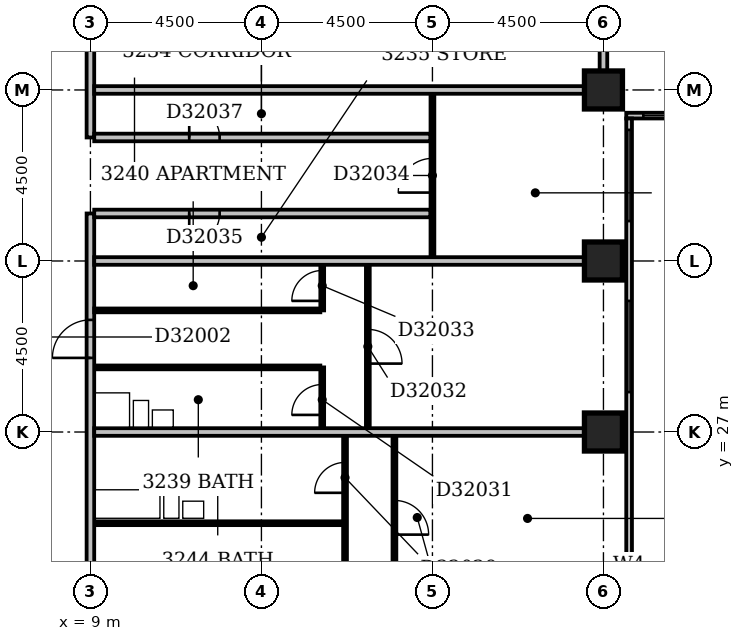
"""IFC4 building model, lengths in metres.
Left out: names, types, materials, properties, quantities, classifications, styles, units other than length and angle.
Written with IfcOpenShell. Run it as: python <this file> out.ifc"""

import sys

from ifc_helpers import new_model, si_unit, direction, frame, frame_2d, origin, origin_2d, place, context, subcontext, project, spatial, rectangle, extrude, element, fill, save


model = new_model("IFC4")
c1 = context("Model", 3, precision=1e-05, world=origin(), true_north=direction((0.0, 1.0)))
c2 = subcontext(c1, "Body", "Model", "MODEL_VIEW")
j1 = project(units=[si_unit("LENGTHUNIT", "METRE"), si_unit("PLANEANGLEUNIT", "RADIAN")], contexts=[c1])
p1 = place(None, origin())
s1 = spatial("IfcSite", under=j1, at=p1, CompositionType="ELEMENT")
p2 = place(p1, origin())
s2 = spatial("IfcBuilding", under=s1, at=p2, CompositionType="ELEMENT")
p3 = place(p2, frame((0.0, 0.0, 130.4)))
s3 = spatial("IfcBuildingStorey", under=s2, at=p3, CompositionType="ELEMENT", Elevation=130.4)
for number, where, z_axis, x_axis in (
    (1, (22.5, 27.0, -0.3), (0.0, 0.0, 1.0), (1.0, 0.0, 0.0)),
    (2, (22.5, 31.5, -0.3), (0.0, 0.0, 1.0), (1.0, 0.0, 0.0)),
    (3, (22.5, 36.0, -0.3), (0.0, 0.0, 1.0), (1.0, 0.0, 0.0)),
):
    element("IfcColumn", number, at=place(p3, frame(where, z_axis=z_axis, x_axis=x_axis)), inside=s3, PredefinedType="COLUMN", context=c2, shape_type="SweptSolid", body=[
        extrude(rectangle(XDim=1.0, YDim=1.0, at=origin_2d()), origin(), (0.0, 0.0, 1.0), 3.6),
    ])
p4 = place(p3, frame((23.175, 17.4, 0.0), z_axis=(0.0, 0.0, 1.0), x_axis=(0.0, 1.0, 0.0)))
e4 = element("IfcWall", 4, at=p4, inside=s3, PredefinedType="STANDARD", context=c2, shape_type="SweptSolid", body=[
    extrude(rectangle(XDim=17.85, YDim=0.15, at=frame_2d((8.925, 0.0))), origin(), (0.0, 0.0, 1.0), 2.7),
])
p5 = place(p4, frame((1.65, 0.0, 0.6)))
e5 = element("IfcOpeningElement", 5, at=p5, cuts=e4, PredefinedType="OPENING", context=c2, shape_type="SweptSolid", body=[
    extrude(rectangle(XDim=2.4, YDim=1.8, at=frame_2d((1.2, 0.9))), frame((0.0, 0.087, 0.0), z_axis=(0.0, -1.0, 0.0), x_axis=(1.0, 0.0, 0.0)), (0.0, 0.0, 1.0), 0.174),
])
p6 = place(p4, frame((5.801, 0.0, 0.6)))
e6 = element("IfcOpeningElement", 6, at=p6, cuts=e4, PredefinedType="OPENING", context=c2, shape_type="SweptSolid", body=[
    extrude(rectangle(XDim=0.6, YDim=1.8, at=frame_2d((0.3, 0.9))), frame((0.0, 0.087, 0.0), z_axis=(0.0, -1.0, 0.0), x_axis=(1.0, 0.0, 0.0)), (0.0, 0.0, 1.0), 0.174),
])
p7 = place(p4, frame((10.65, 0.0, 0.6)))
e7 = element("IfcOpeningElement", 7, at=p7, cuts=e4, PredefinedType="OPENING", context=c2, shape_type="SweptSolid", body=[
    extrude(rectangle(XDim=2.4, YDim=1.8, at=frame_2d((1.2, 0.9))), frame((0.0, 0.087, 0.0), z_axis=(0.0, -1.0, 0.0), x_axis=(1.0, 0.0, 0.0)), (0.0, 0.0, 1.0), 0.174),
])
p8 = place(p4, frame((15.15, 0.0, 0.6)))
e8 = element("IfcOpeningElement", 8, at=p8, cuts=e4, PredefinedType="OPENING", context=c2, shape_type="SweptSolid", body=[
    extrude(rectangle(XDim=2.4, YDim=1.8, at=frame_2d((1.2, 0.9))), frame((0.0, 0.087, 0.0), z_axis=(0.0, -1.0, 0.0), x_axis=(1.0, 0.0, 0.0)), (0.0, 0.0, 1.0), 0.174),
])
p9 = place(p3, frame((23.1, 35.325, 0.0), z_axis=(0.0, 0.0, 1.0), x_axis=(1.0, 0.0, 0.0)))
e9 = element("IfcWall", 9, at=p9, inside=s3, PredefinedType="STANDARD", context=c2, shape_type="SweptSolid", body=[
    extrude(rectangle(XDim=45.15, YDim=0.15, at=frame_2d((22.575, 0.0))), origin(), (0.0, 0.0, 1.0), 2.7),
])
p10 = place(p9, frame((0.45, 0.0, 0.6)))
e10 = element("IfcOpeningElement", 10, at=p10, cuts=e9, PredefinedType="OPENING", context=c2, shape_type="SweptSolid", body=[
    extrude(rectangle(XDim=2.4, YDim=1.8, at=frame_2d((1.2, 0.9))), frame((0.0, 0.087, 0.0), z_axis=(0.0, -1.0, 0.0), x_axis=(1.0, 0.0, 0.0)), (0.0, 0.0, 1.0), 0.174),
])
p11 = place(p9, frame((6.417, 0.0, 0.6)))
e11 = element("IfcOpeningElement", 11, at=p11, cuts=e9, PredefinedType="OPENING", context=c2, shape_type="SweptSolid", body=[
    extrude(rectangle(XDim=1.2, YDim=1.8, at=frame_2d((0.6, 0.9))), frame((0.0, 0.087, 0.0), z_axis=(0.0, -1.0, 0.0), x_axis=(1.0, 0.0, 0.0)), (0.0, 0.0, 1.0), 0.174),
])
p12 = place(p9, frame((9.45, 0.0, 0.6)))
e12 = element("IfcOpeningElement", 12, at=p12, cuts=e9, PredefinedType="OPENING", context=c2, shape_type="SweptSolid", body=[
    extrude(rectangle(XDim=2.4, YDim=1.8, at=frame_2d((1.2, 0.9))), frame((0.0, 0.087, 0.0), z_axis=(0.0, -1.0, 0.0), x_axis=(1.0, 0.0, 0.0)), (0.0, 0.0, 1.0), 0.174),
])
p13 = place(p9, frame((13.95, 0.0, 0.6)))
e13 = element("IfcOpeningElement", 13, at=p13, cuts=e9, PredefinedType="OPENING", context=c2, shape_type="SweptSolid", body=[
    extrude(rectangle(XDim=2.4, YDim=1.8, at=frame_2d((1.2, 0.9))), frame((0.0, 0.087, 0.0), z_axis=(0.0, -1.0, 0.0), x_axis=(1.0, 0.0, 0.0)), (0.0, 0.0, 1.0), 0.174),
])
p14 = place(p9, frame((18.16, 0.0, 0.6)))
e14 = element("IfcOpeningElement", 14, at=p14, cuts=e9, PredefinedType="OPENING", context=c2, shape_type="SweptSolid", body=[
    extrude(rectangle(XDim=1.8, YDim=1.8, at=frame_2d((0.9, 0.9))), frame((0.0, 0.087, 0.0), z_axis=(0.0, -1.0, 0.0), x_axis=(1.0, 0.0, 0.0)), (0.0, 0.0, 1.0), 0.174),
])
p15 = place(p9, frame((22.95, 0.0, 0.6)))
e15 = element("IfcOpeningElement", 15, at=p15, cuts=e9, PredefinedType="OPENING", context=c2, shape_type="SweptSolid", body=[
    extrude(rectangle(XDim=2.4, YDim=1.8, at=frame_2d((1.2, 0.9))), frame((0.0, 0.087, 0.0), z_axis=(0.0, -1.0, 0.0), x_axis=(1.0, 0.0, 0.0)), (0.0, 0.0, 1.0), 0.174),
])
p16 = place(p9, frame((27.45, 0.0, 0.6)))
e16 = element("IfcOpeningElement", 16, at=p16, cuts=e9, PredefinedType="OPENING", context=c2, shape_type="SweptSolid", body=[
    extrude(rectangle(XDim=2.4, YDim=1.8, at=frame_2d((1.2, 0.9))), frame((0.0, 0.087, 0.0), z_axis=(0.0, -1.0, 0.0), x_axis=(1.0, 0.0, 0.0)), (0.0, 0.0, 1.0), 0.174),
])
p17 = place(p9, frame((31.631, 0.0, 0.6)))
e17 = element("IfcOpeningElement", 17, at=p17, cuts=e9, PredefinedType="OPENING", context=c2, shape_type="SweptSolid", body=[
    extrude(rectangle(XDim=0.9, YDim=1.8, at=frame_2d((0.45, 0.9))), frame((0.0, 0.087, 0.0), z_axis=(0.0, -1.0, 0.0), x_axis=(1.0, 0.0, 0.0)), (0.0, 0.0, 1.0), 0.174),
])
p18 = place(p9, frame((36.45, 0.0, 0.6)))
e18 = element("IfcOpeningElement", 18, at=p18, cuts=e9, PredefinedType="OPENING", context=c2, shape_type="SweptSolid", body=[
    extrude(rectangle(XDim=2.4, YDim=1.8, at=frame_2d((1.2, 0.9))), frame((0.0, 0.087, 0.0), z_axis=(0.0, -1.0, 0.0), x_axis=(1.0, 0.0, 0.0)), (0.0, 0.0, 1.0), 0.174),
])
p19 = place(p9, frame((40.95, 0.0, 0.6)))
e19 = element("IfcOpeningElement", 19, at=p19, cuts=e9, PredefinedType="OPENING", context=c2, shape_type="SweptSolid", body=[
    extrude(rectangle(XDim=2.4, YDim=1.8, at=frame_2d((1.2, 0.9))), frame((0.0, 0.087, 0.0), z_axis=(0.0, -1.0, 0.0), x_axis=(1.0, 0.0, 0.0)), (0.0, 0.0, 1.0), 0.174),
])
p20 = place(p3, frame((9.0, 5.0, 0.0), z_axis=(0.0, 0.0, 1.0), x_axis=(0.0, 1.0, 0.0)))
e20 = element("IfcWall", 20, at=p20, inside=s3, PredefinedType="PARTITIONING", context=c2, shape_type="SweptSolid", body=[
    extrude(rectangle(XDim=27.75, YDim=0.2, at=frame_2d((13.875, 0.0))), origin(), (0.0, 0.0, 1.0), 3.3),
])
p21 = place(p20, frame((23.95, 0.0, 0.0)))
e21 = element("IfcOpeningElement", 21, at=p21, cuts=e20, PredefinedType="OPENING", context=c2, shape_type="SweptSolid", body=[
    extrude(rectangle(XDim=1.0, YDim=2.1, at=frame_2d((0.5, 1.05))), frame((0.0, 0.112, 0.0), z_axis=(0.0, -1.0, 0.0), x_axis=(1.0, 0.0, 0.0)), (0.0, 0.0, 1.0), 0.224),
])
p22 = place(p20, frame((13.3, 0.0, 0.0)))
e22 = element("IfcOpeningElement", 22, at=p22, cuts=e20, PredefinedType="OPENING", context=c2, shape_type="SweptSolid", body=[
    extrude(rectangle(XDim=1.0, YDim=2.1, at=frame_2d((0.5, 1.05))), frame((0.0, 0.112, 0.0), z_axis=(0.0, -1.0, 0.0), x_axis=(1.0, 0.0, 0.0)), (0.0, 0.0, 1.0), 0.224),
])
p23 = place(p20, frame((11.7, 0.0, 0.0)))
e23 = element("IfcOpeningElement", 23, at=p23, cuts=e20, PredefinedType="OPENING", context=c2, shape_type="SweptSolid", body=[
    extrude(rectangle(XDim=1.0, YDim=2.1, at=frame_2d((0.5, 1.05))), frame((0.0, 0.112, 0.0), z_axis=(0.0, -1.0, 0.0), x_axis=(1.0, 0.0, 0.0)), (0.0, 0.0, 1.0), 0.224),
])
p24 = place(p20, frame((1.5, 0.0, 0.0)))
e24 = element("IfcOpeningElement", 24, at=p24, cuts=e20, PredefinedType="OPENING", context=c2, shape_type="SweptSolid", body=[
    extrude(rectangle(XDim=0.9, YDim=2.1, at=frame_2d((0.45, 1.05))), frame((0.0, 0.112, 0.0), z_axis=(0.0, -1.0, 0.0), x_axis=(1.0, 0.0, 0.0)), (0.0, 0.0, 1.0), 0.224),
])
p25 = place(p3, frame((17.0, 18.1, 0.0), z_axis=(0.0, 0.0, 1.0), x_axis=(0.0, 1.0, 0.0)))
e25 = element("IfcWall", 25, at=p25, inside=s3, PredefinedType="PARTITIONING", context=c2, shape_type="SweptSolid", body=[
    extrude(rectangle(XDim=8.8, YDim=0.1, at=frame_2d((4.4, 0.0))), origin(), (0.0, 0.0, 1.0), 3.3),
])
p26 = place(p25, frame((1.7, 0.0, 0.0)))
e26 = element("IfcOpeningElement", 26, at=p26, cuts=e25, PredefinedType="OPENING", context=c2, shape_type="SweptSolid", body=[
    extrude(rectangle(XDim=0.9, YDim=2.1, at=frame_2d((0.45, 1.05))), frame((0.0, 0.062, 0.0), z_axis=(0.0, -1.0, 0.0), x_axis=(1.0, 0.0, 0.0)), (0.0, 0.0, 1.0), 0.124),
])
p27 = place(p25, frame((6.2, 0.0, 0.0)))
e27 = element("IfcOpeningElement", 27, at=p27, cuts=e25, PredefinedType="OPENING", context=c2, shape_type="SweptSolid", body=[
    extrude(rectangle(XDim=0.9, YDim=2.1, at=frame_2d((0.45, 1.05))), frame((0.0, 0.062, 0.0), z_axis=(0.0, -1.0, 0.0), x_axis=(1.0, 0.0, 0.0)), (0.0, 0.0, 1.0), 0.124),
])
p28 = place(p3, frame((15.7, 19.6, 0.0), z_axis=(0.0, 0.0, 1.0), x_axis=(0.0, 1.0, 0.0)))
e28 = element("IfcWall", 28, at=p28, inside=s3, PredefinedType="PARTITIONING", context=c2, shape_type="SweptSolid", body=[
    extrude(rectangle(XDim=7.3, YDim=0.1, at=frame_2d((3.65, 0.0))), origin(), (0.0, 0.0, 1.0), 3.3),
])
p29 = place(p28, frame((5.8, 0.0, 0.0)))
e29 = element("IfcOpeningElement", 29, at=p29, cuts=e28, PredefinedType="OPENING", context=c2, shape_type="SweptSolid", body=[
    extrude(rectangle(XDim=0.8, YDim=2.1, at=frame_2d((0.4, 1.05))), frame((0.0, 0.062, 0.0), z_axis=(0.0, -1.0, 0.0), x_axis=(1.0, 0.0, 0.0)), (0.0, 0.0, 1.0), 0.124),
])
p30 = place(p28, frame((2.05, 0.0, 0.0)))
e30 = element("IfcOpeningElement", 30, at=p30, cuts=e28, PredefinedType="OPENING", context=c2, shape_type="SweptSolid", body=[
    extrude(rectangle(XDim=0.9, YDim=2.1, at=frame_2d((0.45, 1.05))), frame((0.0, 0.062, 0.0), z_axis=(0.0, -1.0, 0.0), x_axis=(1.0, 0.0, 0.0)), (0.0, 0.0, 1.0), 0.124),
])
p31 = place(p3, frame((9.1, 24.6, 0.0), z_axis=(0.0, 0.0, 1.0), x_axis=(1.0, 0.0, 0.0)))
e31 = element("IfcWall", 31, at=p31, inside=s3, PredefinedType="PLUMBINGWALL", context=c2, shape_type="SweptSolid", body=[
    extrude(rectangle(XDim=6.55, YDim=0.1, at=frame_2d((3.275, 0.0))), origin(), (0.0, 0.0, 1.0), 3.3),
])
p32 = place(p3, frame((9.1, 27.0, 0.0), z_axis=(0.0, 0.0, 1.0), x_axis=(1.0, 0.0, 0.0)))
e32 = element("IfcWall", 32, at=p32, inside=s3, PredefinedType="PARTITIONING", context=c2, shape_type="SweptSolid", body=[
    extrude(rectangle(XDim=12.9, YDim=0.2, at=frame_2d((6.45, 0.0))), origin(), (0.0, 0.0, 1.0), 2.7),
])
p33 = place(p3, frame((15.1, 27.1, 0.0), z_axis=(0.0, 0.0, 1.0), x_axis=(0.0, 1.0, 0.0)))
e33 = element("IfcWall", 33, at=p33, inside=s3, PredefinedType="PARTITIONING", context=c2, shape_type="SweptSolid", body=[
    extrude(rectangle(XDim=1.6, YDim=0.1, at=frame_2d((0.8, 0.0))), origin(), (0.0, 0.0, 1.0), 3.3),
])
p34 = place(p33, frame((0.35, 0.0, 0.0)))
e34 = element("IfcOpeningElement", 34, at=p34, cuts=e33, PredefinedType="OPENING", context=c2, shape_type="SweptSolid", body=[
    extrude(rectangle(XDim=0.8, YDim=2.1, at=frame_2d((0.4, 1.05))), frame((0.0, 0.062, 0.0), z_axis=(0.0, -1.0, 0.0), x_axis=(1.0, 0.0, 0.0)), (0.0, 0.0, 1.0), 0.124),
])
p35 = place(p3, frame((16.3, 27.1, 0.0), z_axis=(0.0, 0.0, 1.0), x_axis=(0.0, 1.0, 0.0)))
e35 = element("IfcWall", 35, at=p35, inside=s3, PredefinedType="PARTITIONING", context=c2, shape_type="SweptSolid", body=[
    extrude(rectangle(XDim=4.3, YDim=0.1, at=frame_2d((2.15, 0.0))), origin(), (0.0, 0.0, 1.0), 3.3),
])
p36 = place(p35, frame((1.7, 0.0, 0.0)))
e36 = element("IfcOpeningElement", 36, at=p36, cuts=e35, PredefinedType="OPENING", context=c2, shape_type="SweptSolid", body=[
    extrude(rectangle(XDim=0.9, YDim=2.1, at=frame_2d((0.45, 1.05))), frame((0.0, 0.062, 0.0), z_axis=(0.0, -1.0, 0.0), x_axis=(1.0, 0.0, 0.0)), (0.0, 0.0, 1.0), 0.124),
])
p37 = place(p3, frame((9.1, 28.7, 0.0), z_axis=(0.0, 0.0, 1.0), x_axis=(1.0, 0.0, 0.0)))
e37 = element("IfcWall", 37, at=p37, inside=s3, PredefinedType="PLUMBINGWALL", context=c2, shape_type="SweptSolid", body=[
    extrude(rectangle(XDim=5.95, YDim=0.1, at=frame_2d((2.975, 0.0))), origin(), (0.0, 0.0, 1.0), 3.3),
])
p38 = place(p3, frame((9.1, 30.2, 0.0), z_axis=(0.0, 0.0, 1.0), x_axis=(1.0, 0.0, 0.0)))
e38 = element("IfcWall", 38, at=p38, inside=s3, PredefinedType="PARTITIONING", context=c2, shape_type="SweptSolid", body=[
    extrude(rectangle(XDim=5.95, YDim=0.1, at=frame_2d((2.975, 0.0))), origin(), (0.0, 0.0, 1.0), 3.3),
])
p39 = place(p3, frame((15.1, 30.2, 0.0), z_axis=(0.0, 0.0, 1.0), x_axis=(0.0, 1.0, 0.0)))
e39 = element("IfcWall", 39, at=p39, inside=s3, PredefinedType="PARTITIONING", context=c2, shape_type="SweptSolid", body=[
    extrude(rectangle(XDim=1.2, YDim=0.1, at=frame_2d((0.6, 0.0))), origin(), (0.0, 0.0, 1.0), 3.3),
])
p40 = place(p39, frame((0.25, 0.0, 0.0)))
e40 = element("IfcOpeningElement", 40, at=p40, cuts=e39, PredefinedType="OPENING", context=c2, shape_type="SweptSolid", body=[
    extrude(rectangle(XDim=0.8, YDim=2.1, at=frame_2d((0.4, 1.05))), frame((0.0, 0.062, 0.0), z_axis=(0.0, -1.0, 0.0), x_axis=(1.0, 0.0, 0.0)), (0.0, 0.0, 1.0), 0.124),
])
p41 = place(p3, frame((9.1, 31.5, 0.0), z_axis=(0.0, 0.0, 1.0), x_axis=(1.0, 0.0, 0.0)))
e41 = element("IfcWall", 41, at=p41, inside=s3, PredefinedType="PARTITIONING", context=c2, shape_type="SweptSolid", body=[
    extrude(rectangle(XDim=12.9, YDim=0.2, at=frame_2d((6.45, 0.0))), origin(), (0.0, 0.0, 1.0), 3.3),
])
p42 = place(p3, frame((18.0, 31.6, 0.0), z_axis=(0.0, 0.0, 1.0), x_axis=(0.0, 1.0, 0.0)))
e42 = element("IfcWall", 42, at=p42, inside=s3, PredefinedType="PARTITIONING", context=c2, shape_type="SweptSolid", body=[
    extrude(rectangle(XDim=4.3, YDim=0.1, at=frame_2d((2.15, 0.0))), origin(), (0.0, 0.0, 1.0), 3.3),
])
p43 = place(p42, frame((1.7, 0.0, 0.0)))
e43 = element("IfcOpeningElement", 43, at=p43, cuts=e42, PredefinedType="OPENING", context=c2, shape_type="SweptSolid", body=[
    extrude(rectangle(XDim=0.9, YDim=2.1, at=frame_2d((0.45, 1.05))), frame((0.0, 0.062, 0.0), z_axis=(0.0, -1.0, 0.0), x_axis=(1.0, 0.0, 0.0)), (0.0, 0.0, 1.0), 0.124),
])
p44 = place(p3, frame((9.1, 32.75, 0.0), z_axis=(0.0, 0.0, 1.0), x_axis=(1.0, 0.0, 0.0)))
e44 = element("IfcWall", 44, at=p44, inside=s3, PredefinedType="PARTITIONING", context=c2, shape_type="SweptSolid", body=[
    extrude(rectangle(XDim=8.85, YDim=0.2, at=frame_2d((4.425, 0.0))), origin(), (0.0, 0.0, 1.0), 3.3),
])
p45 = place(p44, frame((2.5, 0.0, 0.0)))
e45 = element("IfcOpeningElement", 45, at=p45, cuts=e44, PredefinedType="OPENING", context=c2, shape_type="SweptSolid", body=[
    extrude(rectangle(XDim=0.8, YDim=2.1, at=frame_2d((0.4, 1.05))), frame((0.0, 0.112, 0.0), z_axis=(0.0, -1.0, 0.0), x_axis=(1.0, 0.0, 0.0)), (0.0, 0.0, 1.0), 0.224),
])
p46 = place(p3, frame((9.0, 34.75, 0.0), z_axis=(0.0, 0.0, 1.0), x_axis=(0.0, 1.0, 0.0)))
e46 = element("IfcWall", 46, at=p46, inside=s3, PredefinedType="PARTITIONING", context=c2, shape_type="SweptSolid", body=[
    extrude(rectangle(XDim=14.75, YDim=0.2, at=frame_2d((7.375, 0.0))), origin(), (0.0, 0.0, 1.0), 3.3),
])
p47 = place(p46, frame((5.25, 0.0, 0.0)))
e47 = element("IfcOpeningElement", 47, at=p47, cuts=e46, PredefinedType="OPENING", context=c2, shape_type="SweptSolid", body=[
    extrude(rectangle(XDim=0.9, YDim=2.1, at=frame_2d((0.45, 1.05))), frame((0.0, 0.112, 0.0), z_axis=(0.0, -1.0, 0.0), x_axis=(1.0, 0.0, 0.0)), (0.0, 0.0, 1.0), 0.224),
])
p48 = place(p3, frame((9.1, 34.75, 0.0), z_axis=(0.0, 0.0, 1.0), x_axis=(1.0, 0.0, 0.0)))
e48 = element("IfcWall", 48, at=p48, inside=s3, PredefinedType="PARTITIONING", context=c2, shape_type="SweptSolid", body=[
    extrude(rectangle(XDim=8.85, YDim=0.2, at=frame_2d((4.425, 0.0))), origin(), (0.0, 0.0, 1.0), 3.3),
])
p49 = place(p48, frame((2.5, 0.0, 0.0)))
e49 = element("IfcOpeningElement", 49, at=p49, cuts=e48, PredefinedType="OPENING", context=c2, shape_type="SweptSolid", body=[
    extrude(rectangle(XDim=0.8, YDim=2.1, at=frame_2d((0.4, 1.05))), frame((0.0, 0.112, 0.0), z_axis=(0.0, -1.0, 0.0), x_axis=(1.0, 0.0, 0.0)), (0.0, 0.0, 1.0), 0.224),
])
for number, where, z_axis, x_axis in (
    (50, (9.1, 36.0, 0.0), (0.0, 0.0, 1.0), (1.0, 0.0, 0.0)),
    (51, (22.5, 36.5, 0.0), (0.0, 0.0, 1.0), (0.0, 1.0, 0.0)),
):
    element("IfcWall", number, at=place(p3, frame(where, z_axis=z_axis, x_axis=x_axis)), inside=s3, PredefinedType="PARTITIONING", context=c2, shape_type="SweptSolid", body=[
        extrude(rectangle(XDim=12.9, YDim=0.2, at=frame_2d((6.45, 0.0))), origin(), (0.0, 0.0, 1.0), 3.3),
    ])
p50 = place(p6, origin())
e52 = element("IfcWindow", 52, at=p50, inside=s3, PartitioningType="SINGLE_PANEL", PredefinedType="WINDOW", context=c2, shape_type="SweptSolid", body=[
    extrude(rectangle(XDim=0.6, YDim=1.8, at=frame_2d((0.3, 0.9))), frame((0.0, 0.03, 0.0), z_axis=(0.0, -1.0, 0.0), x_axis=(1.0, 0.0, 0.0)), (0.0, 0.0, 1.0), 0.06),
])
fill(e6, e52)
p51 = place(p7, origin())
e53 = element("IfcWindow", 53, at=p51, inside=s3, PartitioningType="SINGLE_PANEL", PredefinedType="WINDOW", context=c2, shape_type="SweptSolid", body=[
    extrude(rectangle(XDim=2.4, YDim=1.8, at=frame_2d((1.2, 0.9))), frame((0.0, 0.03, 0.0), z_axis=(0.0, -1.0, 0.0), x_axis=(1.0, 0.0, 0.0)), (0.0, 0.0, 1.0), 0.06),
])
fill(e7, e53)
p52 = place(p8, origin())
e54 = element("IfcWindow", 54, at=p52, inside=s3, PartitioningType="SINGLE_PANEL", PredefinedType="WINDOW", context=c2, shape_type="SweptSolid", body=[
    extrude(rectangle(XDim=2.4, YDim=1.8, at=frame_2d((1.2, 0.9))), frame((0.0, 0.03, 0.0), z_axis=(0.0, -1.0, 0.0), x_axis=(1.0, 0.0, 0.0)), (0.0, 0.0, 1.0), 0.06),
])
fill(e8, e54)
p53 = place(p10, origin())
e55 = element("IfcWindow", 55, at=p53, inside=s3, PartitioningType="SINGLE_PANEL", PredefinedType="WINDOW", context=c2, shape_type="SweptSolid", body=[
    extrude(rectangle(XDim=2.4, YDim=1.8, at=frame_2d((1.2, 0.9))), frame((0.0, 0.03, 0.0), z_axis=(0.0, -1.0, 0.0), x_axis=(1.0, 0.0, 0.0)), (0.0, 0.0, 1.0), 0.06),
])
fill(e10, e55)
p54 = place(p21, origin())
e56 = element("IfcDoor", 56, at=p54, inside=s3, OperationType="SINGLE_SWING_LEFT", PredefinedType="DOOR", context=c2, shape_type="SweptSolid", body=[
    extrude(rectangle(XDim=1.0, YDim=2.1, at=frame_2d((0.5, 1.05))), frame((0.0, 0.025, 0.0), z_axis=(0.0, -1.0, 0.0), x_axis=(1.0, 0.0, 0.0)), (0.0, 0.0, 1.0), 0.05),
])
fill(e21, e56)
p55 = place(p27, frame((0.9, 0.0, 0.0), z_axis=(0.0, 0.0, 1.0), x_axis=(-1.0, 0.0, 0.0)))
e57 = element("IfcDoor", 57, at=p55, inside=s3, OperationType="SINGLE_SWING_RIGHT", PredefinedType="DOOR", context=c2, shape_type="SweptSolid", body=[
    extrude(rectangle(XDim=0.9, YDim=2.1, at=frame_2d((0.45, 1.05))), frame((0.0, 0.025, 0.0), z_axis=(0.0, -1.0, 0.0), x_axis=(1.0, 0.0, 0.0)), (0.0, 0.0, 1.0), 0.05),
])
fill(e27, e57)
p56 = place(p29, origin())
e58 = element("IfcDoor", 58, at=p56, inside=s3, OperationType="SINGLE_SWING_LEFT", PredefinedType="DOOR", context=c2, shape_type="SweptSolid", body=[
    extrude(rectangle(XDim=0.8, YDim=2.1, at=frame_2d((0.4, 1.05))), frame((0.0, 0.025, 0.0), z_axis=(0.0, -1.0, 0.0), x_axis=(1.0, 0.0, 0.0)), (0.0, 0.0, 1.0), 0.05),
])
fill(e29, e58)
p57 = place(p34, origin())
e59 = element("IfcDoor", 59, at=p57, inside=s3, OperationType="SINGLE_SWING_LEFT", PredefinedType="DOOR", context=c2, shape_type="SweptSolid", body=[
    extrude(rectangle(XDim=0.8, YDim=2.1, at=frame_2d((0.4, 1.05))), frame((0.0, 0.025, 0.0), z_axis=(0.0, -1.0, 0.0), x_axis=(1.0, 0.0, 0.0)), (0.0, 0.0, 1.0), 0.05),
])
fill(e34, e59)
p58 = place(p36, frame((0.9, 0.0, 0.0), z_axis=(0.0, 0.0, 1.0), x_axis=(-1.0, 0.0, 0.0)))
e60 = element("IfcDoor", 60, at=p58, inside=s3, OperationType="SINGLE_SWING_RIGHT", PredefinedType="DOOR", context=c2, shape_type="SweptSolid", body=[
    extrude(rectangle(XDim=0.9, YDim=2.1, at=frame_2d((0.45, 1.05))), frame((0.0, 0.025, 0.0), z_axis=(0.0, -1.0, 0.0), x_axis=(1.0, 0.0, 0.0)), (0.0, 0.0, 1.0), 0.05),
])
fill(e36, e60)
p59 = place(p40, origin())
e61 = element("IfcDoor", 61, at=p59, inside=s3, OperationType="SINGLE_SWING_LEFT", PredefinedType="DOOR", context=c2, shape_type="SweptSolid", body=[
    extrude(rectangle(XDim=0.8, YDim=2.1, at=frame_2d((0.4, 1.05))), frame((0.0, 0.025, 0.0), z_axis=(0.0, -1.0, 0.0), x_axis=(1.0, 0.0, 0.0)), (0.0, 0.0, 1.0), 0.05),
])
fill(e40, e61)
p60 = place(p43, origin())
e62 = element("IfcDoor", 62, at=p60, inside=s3, OperationType="SINGLE_SWING_LEFT", PredefinedType="DOOR", context=c2, shape_type="SweptSolid", body=[
    extrude(rectangle(XDim=0.9, YDim=2.1, at=frame_2d((0.45, 1.05))), frame((0.0, 0.025, 0.0), z_axis=(0.0, -1.0, 0.0), x_axis=(1.0, 0.0, 0.0)), (0.0, 0.0, 1.0), 0.05),
])
fill(e43, e62)
p61 = place(p45, frame((0.8, 0.0, 0.0), z_axis=(0.0, 0.0, 1.0), x_axis=(-1.0, 0.0, 0.0)))
e63 = element("IfcDoor", 63, at=p61, inside=s3, OperationType="SINGLE_SWING_RIGHT", PredefinedType="DOOR", context=c2, shape_type="SweptSolid", body=[
    extrude(rectangle(XDim=0.8, YDim=2.1, at=frame_2d((0.4, 1.05))), frame((0.0, 0.025, 0.0), z_axis=(0.0, -1.0, 0.0), x_axis=(1.0, 0.0, 0.0)), (0.0, 0.0, 1.0), 0.05),
])
fill(e45, e63)
p62 = place(p49, origin())
e64 = element("IfcDoor", 64, at=p62, inside=s3, OperationType="SINGLE_SWING_LEFT", PredefinedType="DOOR", context=c2, shape_type="SweptSolid", body=[
    extrude(rectangle(XDim=0.8, YDim=2.1, at=frame_2d((0.4, 1.05))), frame((0.0, 0.025, 0.0), z_axis=(0.0, -1.0, 0.0), x_axis=(1.0, 0.0, 0.0)), (0.0, 0.0, 1.0), 0.05),
])
fill(e49, e64)
save(model, sys.argv[1])
